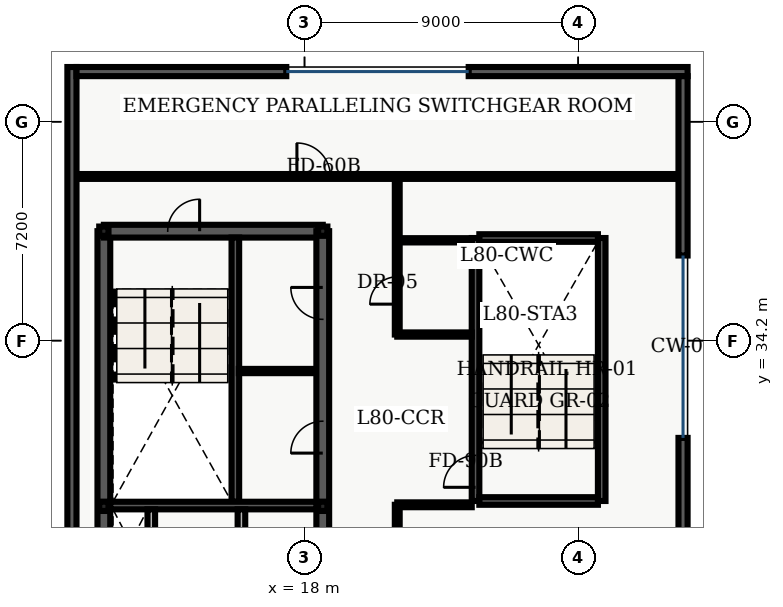
"""IFC4 building model, lengths in metres.
Left out: names, types, materials, properties, quantities, classifications, styles, units other than length and angle.
Written with IfcOpenShell. Run it as: python <this file> out.ifc"""

import sys

from ifc_helpers import new_model, entity, si_unit, converted_unit, direction, frame, origin_with_axes, origin_2d_with_axis, place, context, subcontext, project, spatial, polyline, rectangle, hollow_rectangle, outline, extrude, element, fill, save


model = new_model("IFC4")
c1 = context("Model", 3, precision=1e-05, world=origin_with_axes(), true_north=direction((0.0, 1.0)))
c2 = subcontext(c1, "Body", "Model", "MODEL_VIEW")
j1 = project(units=[si_unit("LENGTHUNIT", "METRE"), converted_unit("PLANEANGLEUNIT", "DEGREE", entity("IfcPlaneAngleMeasure", 0.017), si_unit("PLANEANGLEUNIT", "RADIAN"), dimensions=[0, 0, 0, 0, 0, 0, 0])], contexts=[c1])
p1 = place(None, origin_with_axes())
s1 = spatial("IfcSite", under=j1, at=p1, CompositionType="ELEMENT")
p2 = place(p1, origin_with_axes())
s2 = spatial("IfcBuilding", under=s1, at=p2, CompositionType="ELEMENT")
p3 = place(p2, frame((0.0, 0.0, 324.3), z_axis=(0.0, 0.0, 1.0), x_axis=(1.0, 0.0, 0.0)))
s3 = spatial("IfcBuildingStorey", under=s2, at=p3, CompositionType="ELEMENT", Elevation=324.3)
p4 = place(p3, frame((11.4, 10.8, 0.0), z_axis=(0.0, 0.0, 1.0), x_axis=(0.0, 1.0, 0.0)))
e1 = element("IfcWall", 1, at=p4, inside=s3, PredefinedType="SHEAR", context=c2, shape_type="SweptSolid", body=[
    extrude(outline(polyline([(0.0, -0.21), (27.0, -0.21), (27.0, 0.21), (0.0, 0.21), (0.0, -0.21)])), origin_with_axes(), (0.0, 0.0, 1.0), 3.64),
])
p5 = place(p3, frame((11.4, 37.8, 0.0), z_axis=(0.0, 0.0, 1.0), x_axis=(1.0, 0.0, 0.0)))
e2 = element("IfcWall", 2, at=p5, inside=s3, PredefinedType="SHEAR", context=c2, shape_type="SweptSolid", body=[
    extrude(outline(polyline([(0.0, -0.21), (7.2, -0.21), (7.2, 0.21), (0.0, 0.21), (0.0, -0.21)])), origin_with_axes(), (0.0, 0.0, 1.0), 3.64),
])
p6 = place(p5, frame((2.625, 0.0, 0.0), z_axis=(0.0, 0.0, 1.0), x_axis=(1.0, 0.0, 0.0)))
e3 = element("IfcOpeningElement", 3, at=p6, cuts=e2, PredefinedType="OPENING", context=c2, shape_type="SweptSolid", body=[
    extrude(rectangle(XDim=1.05, YDim=0.44, at=origin_2d_with_axis()), origin_with_axes(), (0.0, 0.0, 1.0), 2.15),
])
p7 = place(p3, frame((18.6, 24.3, 0.0), z_axis=(0.0, 0.0, 1.0), x_axis=(0.0, 1.0, 0.0)))
e4 = element("IfcWall", 4, at=p7, inside=s3, PredefinedType="SHEAR", context=c2, shape_type="SweptSolid", body=[
    extrude(outline(polyline([(0.0, -0.21), (13.5, -0.21), (13.5, 0.21), (0.0, 0.21), (0.0, -0.21)])), origin_with_axes(), (0.0, 0.0, 1.0), 3.64),
])
p8 = place(p7, frame((3.2, 0.0, 0.0), z_axis=(0.0, 0.0, 1.0), x_axis=(1.0, 0.0, 0.0)))
e5 = element("IfcOpeningElement", 5, at=p8, cuts=e4, PredefinedType="OPENING", context=c2, shape_type="SweptSolid", body=[
    extrude(rectangle(XDim=0.9, YDim=0.44, at=origin_2d_with_axis()), origin_with_axes(), (0.0, 0.0, 1.0), 2.15),
])
p9 = place(p7, frame((6.725, 0.0, 0.0), z_axis=(0.0, 0.0, 1.0), x_axis=(1.0, 0.0, 0.0)))
e6 = element("IfcOpeningElement", 6, at=p9, cuts=e4, PredefinedType="OPENING", context=c2, shape_type="SweptSolid", body=[
    extrude(rectangle(XDim=1.05, YDim=0.44, at=origin_2d_with_axis()), origin_with_axes(), (0.0, 0.0, 1.0), 2.15),
])
p10 = place(p7, frame((11.125, 0.0, 0.0), z_axis=(0.0, 0.0, 1.0), x_axis=(1.0, 0.0, 0.0)))
e7 = element("IfcOpeningElement", 7, at=p10, cuts=e4, PredefinedType="OPENING", context=c2, shape_type="SweptSolid", body=[
    extrude(rectangle(XDim=1.05, YDim=0.44, at=origin_2d_with_axis()), origin_with_axes(), (0.0, 0.0, 1.0), 2.15),
])
p11 = place(p3, frame((15.725, 28.9, 0.0), z_axis=(0.0, 0.0, 1.0), x_axis=(0.0, 1.0, 0.0)))
e8 = element("IfcWall", 8, at=p11, inside=s3, PredefinedType="SHEAR", context=c2, shape_type="SweptSolid", body=[
    extrude(outline(polyline([(0.0, -0.125), (8.69, -0.125), (8.69, 0.125), (0.0, 0.125), (0.0, -0.125)])), origin_with_axes(), (0.0, 0.0, 1.0), 3.64),
])
p12 = place(p3, frame((11.61, 28.775, 0.0), z_axis=(0.0, 0.0, 1.0), x_axis=(1.0, 0.0, 0.0)))
e9 = element("IfcWall", 9, at=p12, inside=s3, PredefinedType="SHEAR", context=c2, shape_type="SweptSolid", body=[
    extrude(outline(polyline([(0.0, -0.125), (6.78, -0.125), (6.78, 0.125), (0.0, 0.125), (0.0, -0.125)])), origin_with_axes(), (0.0, 0.0, 1.0), 3.64),
])
for number, where, z_axis, x_axis in (
    (10, (12.96, 26.45, 0.0), (0.0, 0.0, 1.0), (0.0, 1.0, 0.0)),
    (11, (15.925, 26.45, 0.0), (0.0, 0.0, 1.0), (0.0, 1.0, 0.0)),
):
    element("IfcWall", number, at=place(p3, frame(where, z_axis=z_axis, x_axis=x_axis)), inside=s3, PredefinedType="SOLIDWALL", context=c2, shape_type="SweptSolid", body=[
        extrude(outline(polyline([(0.0, -0.125), (2.2, -0.125), (2.2, 0.125), (0.0, 0.125), (0.0, -0.125)])), origin_with_axes(), (0.0, 0.0, 1.0), 2.68),
    ])
p13 = place(p3, frame((23.625, 28.925, 0.0), z_axis=(0.0, 0.0, 1.0), x_axis=(0.0, 1.0, 0.0)))
e12 = element("IfcWall", 12, at=p13, inside=s3, PredefinedType="SHEAR", context=c2, shape_type="SweptSolid", body=[
    extrude(outline(polyline([(0.0, -0.125), (8.65, -0.125), (8.65, 0.125), (0.0, 0.125), (0.0, -0.125)])), origin_with_axes(), (0.0, 0.0, 1.0), 3.64),
])
p14 = place(p13, frame((0.975, 0.0, 0.0), z_axis=(0.0, 0.0, 1.0), x_axis=(1.0, 0.0, 0.0)))
e13 = element("IfcOpeningElement", 13, at=p14, cuts=e12, PredefinedType="OPENING", context=c2, shape_type="SweptSolid", body=[
    extrude(rectangle(XDim=1.05, YDim=0.27, at=origin_2d_with_axis()), origin_with_axes(), (0.0, 0.0, 1.0), 2.15),
])
p15 = place(p3, frame((27.775, 28.925, 0.0), z_axis=(0.0, 0.0, 1.0), x_axis=(0.0, 1.0, 0.0)))
e14 = element("IfcWall", 14, at=p15, inside=s3, PredefinedType="SHEAR", context=c2, shape_type="SweptSolid", body=[
    extrude(outline(polyline([(0.0, -0.125), (8.65, -0.125), (8.65, 0.125), (0.0, 0.125), (0.0, -0.125)])), origin_with_axes(), (0.0, 0.0, 1.0), 3.64),
])
for number, where, z_axis, x_axis in (
    (15, (23.75, 28.925, 0.0), (0.0, 0.0, 1.0), (1.0, 0.0, 0.0)),
    (16, (23.75, 37.575, 0.0), (0.0, 0.0, 1.0), (1.0, 0.0, 0.0)),
):
    element("IfcWall", number, at=place(p3, frame(where, z_axis=z_axis, x_axis=x_axis)), inside=s3, PredefinedType="SHEAR", context=c2, shape_type="SweptSolid", body=[
        extrude(outline(polyline([(0.0, -0.125), (3.9, -0.125), (3.9, 0.125), (0.0, 0.125), (0.0, -0.125)])), origin_with_axes(), (0.0, 0.0, 1.0), 3.64),
    ])
for number, where, z_axis, x_axis in (
    (17, (11.4, 28.75, 0.0), (0.0, 0.0, 1.0), (1.0, 0.0, 0.0)),
    (18, (11.4, 37.8, 0.0), (0.0, 0.0, 1.0), (1.0, 0.0, 0.0)),
    (19, (18.6, 28.75, 0.0), (0.0, 0.0, 1.0), (1.0, 0.0, 0.0)),
    (20, (18.6, 37.8, 0.0), (0.0, 0.0, 1.0), (1.0, 0.0, 0.0)),
):
    element("IfcColumn", number, at=place(p3, frame(where, z_axis=z_axis, x_axis=x_axis)), inside=s3, PredefinedType="COLUMN", context=c2, shape_type="SweptSolid", body=[
        extrude(hollow_rectangle(XDim=0.305, YDim=0.305, WallThickness=0.015, InnerFilletRadius=0.015, OuterFilletRadius=0.03, at=origin_2d_with_axis()), origin_with_axes(), (0.0, 0.0, 1.0), 3.9),
    ])
p16 = place(p3, frame((15.84, 33.2, 0.0), z_axis=(0.0, 0.0, 1.0), x_axis=(1.0, 0.0, 0.0)))
e21 = element("IfcWall", 21, at=p16, inside=s3, PredefinedType="PARTITIONING", context=c2, shape_type="SweptSolid", body=[
    extrude(outline(polyline([(0.0, -0.07), (2.46, -0.07), (2.46, 0.07), (0.0, 0.07), (0.0, -0.07)])), origin_with_axes(), (0.0, 0.0, 1.0), 2.68),
])
for number, where, z_axis, x_axis in (
    (22, (21.05, 34.4, 0.0), (0.0, 0.0, 1.0), (1.0, 0.0, 0.0)),
    (23, (21.05, 37.5, 0.0), (0.0, 0.0, 1.0), (1.0, 0.0, 0.0)),
):
    element("IfcWall", number, at=place(p3, frame(where, z_axis=z_axis, x_axis=x_axis)), inside=s3, PredefinedType="PARTITIONING", context=c2, shape_type="SweptSolid", body=[
        extrude(outline(polyline([(0.0, -0.07), (2.45, -0.07), (2.45, 0.07), (0.0, 0.07), (0.0, -0.07)])), origin_with_axes(), (0.0, 0.0, 1.0), 2.68),
    ])
p17 = place(p3, frame((21.05, 5.695, 0.0), z_axis=(0.0, 0.0, 1.0), x_axis=(0.0, 1.0, 0.0)))
e24 = element("IfcWall", 24, at=p17, inside=s3, PredefinedType="PARTITIONING", context=c2, shape_type="SweptSolid", body=[
    extrude(outline(polyline([(0.0, -0.08), (23.105, -0.08), (23.105, 0.08), (0.0, 0.08), (0.0, -0.08)])), origin_with_axes(), (0.0, 0.0, 1.0), 2.68),
])
p18 = place(p17, frame((4.78, 0.0, 0.0), z_axis=(0.0, 0.0, 1.0), x_axis=(1.0, 0.0, 0.0)))
e25 = element("IfcOpeningElement", 25, at=p18, cuts=e24, PredefinedType="OPENING", context=c2, shape_type="SweptSolid", body=[
    extrude(rectangle(XDim=1.05, YDim=0.18, at=origin_2d_with_axis()), origin_with_axes(), (0.0, 0.0, 1.0), 2.15),
])
p19 = place(p3, frame((21.05, 34.4, 0.0), z_axis=(0.0, 0.0, 1.0), x_axis=(0.0, 1.0, 0.0)))
e26 = element("IfcWall", 26, at=p19, inside=s3, PredefinedType="PARTITIONING", context=c2, shape_type="SweptSolid", body=[
    extrude(outline(polyline([(0.0, -0.08), (5.2, -0.08), (5.2, 0.08), (0.0, 0.08), (0.0, -0.08)])), origin_with_axes(), (0.0, 0.0, 1.0), 2.68),
])
p20 = place(p19, frame((1.45, 0.0, 0.0), z_axis=(0.0, 0.0, 1.0), x_axis=(1.0, 0.0, 0.0)))
e27 = element("IfcOpeningElement", 27, at=p20, cuts=e26, PredefinedType="OPENING", context=c2, shape_type="SweptSolid", body=[
    extrude(rectangle(XDim=0.9, YDim=0.18, at=origin_2d_with_axis()), origin_with_axes(), (0.0, 0.0, 1.0), 2.15),
])
p21 = place(p3, frame((21.05, 28.8, 0.0), z_axis=(0.0, 0.0, 1.0), x_axis=(1.0, 0.0, 0.0)))
e28 = element("IfcWall", 28, at=p21, inside=s3, PredefinedType="PARTITIONING", context=c2, shape_type="SweptSolid", body=[
    extrude(outline(polyline([(0.0, -0.08), (2.45, -0.08), (2.45, 0.08), (0.0, 0.08), (0.0, -0.08)])), origin_with_axes(), (0.0, 0.0, 1.0), 2.68),
])
p22 = place(p3, frame((10.495, 39.6, 0.0), z_axis=(0.0, 0.0, 1.0), x_axis=(1.0, 0.0, 0.0)))
e29 = element("IfcWall", 29, at=p22, inside=s3, PredefinedType="PARTITIONING", context=c2, shape_type="SweptSolid", body=[
    extrude(outline(polyline([(0.0, -0.08), (19.81, -0.08), (19.81, 0.08), (0.0, 0.08), (0.0, -0.08)])), origin_with_axes(), (0.0, 0.0, 1.0), 2.68),
])
p23 = place(p22, frame((7.805, 0.0, 0.0), z_axis=(0.0, 0.0, 1.0), x_axis=(1.0, 0.0, 0.0)))
e30 = element("IfcOpeningElement", 30, at=p23, cuts=e29, PredefinedType="OPENING", context=c2, shape_type="SweptSolid", body=[
    extrude(rectangle(XDim=1.1, YDim=0.18, at=origin_2d_with_axis()), origin_with_axes(), (0.0, 0.0, 1.0), 2.15),
])
p24 = place(p3, frame((10.35, 5.7, 0.0), z_axis=(0.0, 0.0, 1.0), x_axis=(0.0, 1.0, 0.0)))
e31 = element("IfcWall", 31, at=p24, inside=s3, PredefinedType="SOLIDWALL", context=c2, shape_type="SweptSolid", body=[
    extrude(outline(polyline([(0.0, -0.15), (37.5, -0.15), (37.5, 0.15), (0.0, 0.15), (0.0, -0.15)])), origin_with_axes(), (0.0, 0.0, 1.0), 3.64),
])
p25 = place(p3, frame((10.5, 43.05, 0.0), z_axis=(0.0, 0.0, 1.0), x_axis=(1.0, 0.0, 0.0)))
e32 = element("IfcWall", 32, at=p25, inside=s3, PredefinedType="SOLIDWALL", context=c2, shape_type="SweptSolid", body=[
    extrude(outline(polyline([(0.0, -0.15), (6.9, -0.15), (6.9, 0.15), (0.0, 0.15), (0.0, -0.15)])), origin_with_axes(), (0.0, 0.0, 1.0), 3.64),
])
p26 = place(p3, frame((23.4, 43.05, 0.0), z_axis=(0.0, 0.0, 1.0), x_axis=(1.0, 0.0, 0.0)))
e33 = element("IfcWall", 33, at=p26, inside=s3, PredefinedType="SOLIDWALL", context=c2, shape_type="SweptSolid", body=[
    extrude(outline(polyline([(0.0, -0.15), (7.2, -0.15), (7.2, 0.15), (0.0, 0.15), (0.0, -0.15)])), origin_with_axes(), (0.0, 0.0, 1.0), 3.64),
])
p27 = place(p3, frame((30.45, 42.9, 0.0), z_axis=(0.0, 0.0, 1.0), x_axis=(0.0, -1.0, 0.0)))
e34 = element("IfcWall", 34, at=p27, inside=s3, PredefinedType="SOLIDWALL", context=c2, shape_type="SweptSolid", body=[
    extrude(outline(polyline([(0.0, -0.15), (5.9, -0.15), (5.9, 0.15), (0.0, 0.15), (0.0, -0.15)])), origin_with_axes(), (0.0, 0.0, 1.0), 3.64),
])
p28 = place(p3, frame((30.45, 31.0, 0.0), z_axis=(0.0, 0.0, 1.0), x_axis=(0.0, -1.0, 0.0)))
e35 = element("IfcWall", 35, at=p28, inside=s3, PredefinedType="SOLIDWALL", context=c2, shape_type="SweptSolid", body=[
    extrude(outline(polyline([(0.0, -0.15), (25.6, -0.15), (25.6, 0.15), (0.0, 0.15), (0.0, -0.15)])), origin_with_axes(), (0.0, 0.0, 1.0), 3.64),
])
p29 = place(p5, frame((2.625, 0.0, 0.0), z_axis=(0.0, 0.0, 1.0), x_axis=(1.0, 0.0, 0.0)))
e36 = element("IfcDoor", 36, at=p29, inside=s3, OperationType="SINGLE_SWING_RIGHT", PredefinedType="DOOR", context=c2, shape_type="SweptSolid", body=[
    extrude(rectangle(XDim=1.05, YDim=0.09, at=origin_2d_with_axis()), origin_with_axes(), (0.0, 0.0, 1.0), 2.15),
])
fill(e3, e36)
p30 = place(p7, frame((6.725, 0.0, 0.0), z_axis=(0.0, 0.0, 1.0), x_axis=(1.0, 0.0, 0.0)))
e37 = element("IfcDoor", 37, at=p30, inside=s3, OperationType="SINGLE_SWING_LEFT", PredefinedType="DOOR", context=c2, shape_type="SweptSolid", body=[
    extrude(rectangle(XDim=1.05, YDim=0.09, at=origin_2d_with_axis()), origin_with_axes(), (0.0, 0.0, 1.0), 2.15),
])
fill(e6, e37)
p31 = place(p7, frame((11.125, 0.0, 0.0), z_axis=(0.0, 0.0, 1.0), x_axis=(1.0, 0.0, 0.0)))
e38 = element("IfcDoor", 38, at=p31, inside=s3, OperationType="SINGLE_SWING_RIGHT", PredefinedType="DOOR", context=c2, shape_type="SweptSolid", body=[
    extrude(rectangle(XDim=1.05, YDim=0.09, at=origin_2d_with_axis()), origin_with_axes(), (0.0, 0.0, 1.0), 2.15),
])
fill(e7, e38)
p32 = place(p13, frame((0.975, 0.0, 0.0), z_axis=(0.0, 0.0, 1.0), x_axis=(1.0, 0.0, 0.0)))
e39 = element("IfcDoor", 39, at=p32, inside=s3, OperationType="SINGLE_SWING_LEFT", PredefinedType="DOOR", context=c2, shape_type="SweptSolid", body=[
    extrude(rectangle(XDim=1.05, YDim=0.09, at=origin_2d_with_axis()), origin_with_axes(), (0.0, 0.0, 1.0), 2.15),
])
fill(e13, e39)
p33 = place(p19, frame((1.45, 0.0, 0.0), z_axis=(0.0, 0.0, 1.0), x_axis=(1.0, 0.0, 0.0)))
e40 = element("IfcDoor", 40, at=p33, inside=s3, OperationType="SINGLE_SWING_LEFT", PredefinedType="DOOR", context=c2, shape_type="SweptSolid", body=[
    extrude(rectangle(XDim=0.9, YDim=0.09, at=origin_2d_with_axis()), origin_with_axes(), (0.0, 0.0, 1.0), 2.15),
])
fill(e27, e40)
p34 = place(p22, frame((7.805, 0.0, 0.0), z_axis=(0.0, 0.0, 1.0), x_axis=(1.0, 0.0, 0.0)))
e41 = element("IfcDoor", 41, at=p34, inside=s3, OperationType="SINGLE_SWING_LEFT", PredefinedType="DOOR", context=c2, shape_type="SweptSolid", body=[
    extrude(rectangle(XDim=1.1, YDim=0.09, at=origin_2d_with_axis()), origin_with_axes(), (0.0, 0.0, 1.0), 2.15),
])
fill(e30, e41)
save(model, sys.argv[1])
